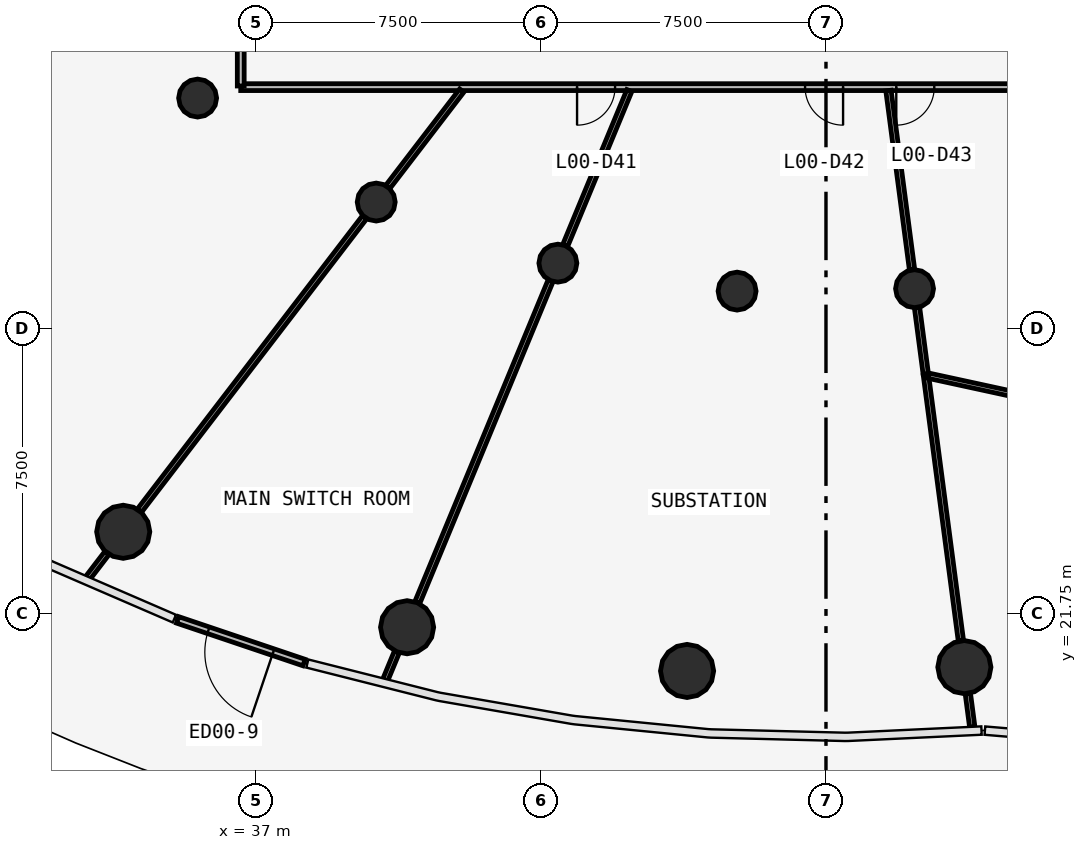
"""IFC4 building model, lengths in metres.
Left out: names, types, materials, properties, quantities, classifications, styles, units other than length and angle.
Written with IfcOpenShell. Run it as: python <this file> out.ifc"""

import sys

from ifc_helpers import new_model, si_unit, direction, frame, frame_2d, origin, origin_2d, place, context, subcontext, project, spatial, rectangle, circle, extrude, source, transform, mapped, element, fill, save


model = new_model("IFC4")
c1 = context("Model", 3, precision=1e-05, world=origin(), true_north=direction((0.0, 1.0)))
c2 = subcontext(c1, "Body", "Model", "MODEL_VIEW")
j1 = project(units=[si_unit("LENGTHUNIT", "METRE"), si_unit("PLANEANGLEUNIT", "RADIAN")], contexts=[c1])
p1 = place(None, origin())
s1 = spatial("IfcSite", under=j1, at=p1, CompositionType="ELEMENT")
p2 = place(p1, origin())
s2 = spatial("IfcBuilding", under=s1, at=p2, CompositionType="ELEMENT")
p3 = place(p2, origin())
s3 = spatial("IfcBuildingStorey", under=s2, at=p3, CompositionType="ELEMENT", Elevation=0.0)
m1 = source(origin(), c2, "Body", "SweptSolid", [
    extrude(circle(Radius=0.7, at=origin_2d()), origin(), (0.0, 0.0, 1.0), 5.35),
])
for number, where, z_axis, x_axis in (
    (1, (33.508, 23.9, -0.35), (0.0, 0.0, 1.0), (1.0, 0.0, 0.0)),
    (2, (40.977, 21.389, -0.35), (0.0, 0.0, 1.0), (1.0, 0.0, 0.0)),
    (3, (48.345, 20.239, -0.35), (0.0, 0.0, 1.0), (1.0, 0.0, 0.0)),
    (4, (55.642, 20.339, -0.35), (0.0, 0.0, 1.0), (1.0, 0.0, 0.0)),
):
    element("IfcColumn", number, at=place(p3, frame(where, z_axis=z_axis, x_axis=x_axis)), inside=s3, PredefinedType="COLUMN", context=c2, shape_type="MappedRepresentation", body=[
        mapped(m1, transform((0.0, 0.0, 0.0), scale=1.0)),
    ])
m2 = source(origin(), c2, "Body", "SweptSolid", [
    extrude(circle(Radius=0.5, at=origin_2d()), origin(), (0.0, 0.0, 1.0), 5.35),
])
for number, where, z_axis, x_axis in (
    (5, (35.465, 35.312, -0.35), (0.0, 0.0, 1.0), (1.0, 0.0, 0.0)),
    (6, (40.165, 32.576, -0.35), (0.0, 0.0, 1.0), (1.0, 0.0, 0.0)),
    (7, (44.945, 30.969, -0.35), (0.0, 0.0, 1.0), (1.0, 0.0, 0.0)),
    (8, (49.661, 30.233, -0.35), (0.0, 0.0, 1.0), (1.0, 0.0, 0.0)),
    (9, (54.331, 30.297, -0.35), (0.0, 0.0, 1.0), (1.0, 0.0, 0.0)),
):
    element("IfcColumn", number, at=place(p3, frame(where, z_axis=z_axis, x_axis=x_axis)), inside=s3, PredefinedType="COLUMN", context=c2, shape_type="MappedRepresentation", body=[
        mapped(m2, transform((0.0, 0.0, 0.0), scale=1.0)),
    ])
p4 = place(p3, frame((38.266, 20.459, 0.0), z_axis=(0.0, 0.0, 1.0), x_axis=(-0.947474115606, 0.319832456541, 0.0)))
e10 = element("IfcWall", 10, at=p4, inside=s3, PredefinedType="STANDARD", context=c2, shape_type="SweptSolid", body=[
    extrude(rectangle(XDim=3.513, YDim=0.18, at=frame_2d((1.756, 0.0))), origin(), (0.0, 0.0, 1.0), 4.65),
])
p5 = place(p4, frame((0.856, 0.0, 0.0)))
e11 = element("IfcOpeningElement", 11, at=p5, cuts=e10, PredefinedType="OPENING", context=c2, shape_type="SweptSolid", body=[
    extrude(rectangle(XDim=1.8, YDim=2.2, at=frame_2d((0.9, 1.1))), frame((0.0, 0.1, 0.0), z_axis=(0.0, -1.0, 0.0), x_axis=(1.0, 0.0, 0.0)), (0.0, 0.0, 1.0), 0.2),
])
p6 = place(p3, frame((67.4, 35.6, 0.0), z_axis=(0.0, 0.0, 1.0), x_axis=(-1.0, 0.0, 0.0)))
e12 = element("IfcWall", 12, at=p6, inside=s3, PredefinedType="PARTITIONING", context=c2, shape_type="SweptSolid", body=[
    extrude(rectangle(XDim=30.8, YDim=0.18, at=frame_2d((15.4, 0.0))), origin(), (0.0, 0.0, 1.0), 3.85),
])
p7 = place(p6, frame((20.95, 0.0, 0.0)))
e13 = element("IfcOpeningElement", 13, at=p7, cuts=e12, PredefinedType="OPENING", context=c2, shape_type="SweptSolid", body=[
    extrude(rectangle(XDim=1.0, YDim=2.1, at=frame_2d((0.5, 1.05))), frame((0.0, 0.1, 0.0), z_axis=(0.0, -1.0, 0.0), x_axis=(1.0, 0.0, 0.0)), (0.0, 0.0, 1.0), 0.2),
])
p8 = place(p6, frame((14.95, 0.0, 0.0)))
e14 = element("IfcOpeningElement", 14, at=p8, cuts=e12, PredefinedType="OPENING", context=c2, shape_type="SweptSolid", body=[
    extrude(rectangle(XDim=1.0, YDim=2.1, at=frame_2d((0.5, 1.05))), frame((0.0, 0.1, 0.0), z_axis=(0.0, -1.0, 0.0), x_axis=(1.0, 0.0, 0.0)), (0.0, 0.0, 1.0), 0.2),
])
p9 = place(p6, frame((12.55, 0.0, 0.0)))
e15 = element("IfcOpeningElement", 15, at=p9, cuts=e12, PredefinedType="OPENING", context=c2, shape_type="SweptSolid", body=[
    extrude(rectangle(XDim=1.0, YDim=2.1, at=frame_2d((0.5, 1.05))), frame((0.0, 0.1, 0.0), z_axis=(0.0, -1.0, 0.0), x_axis=(1.0, 0.0, 0.0)), (0.0, 0.0, 1.0), 0.2),
])
p10 = place(p3, frame((36.6, 35.63, 0.0), z_axis=(0.0, 0.0, 1.0), x_axis=(0.0, 1.0, 0.0)))
e16 = element("IfcWall", 16, at=p10, inside=s3, PredefinedType="PARTITIONING", context=c2, shape_type="SweptSolid", body=[
    extrude(rectangle(XDim=23.583, YDim=0.18, at=frame_2d((11.791, 0.0))), origin(), (0.0, 0.0, 1.0), 3.85),
])
p11 = place(p10, frame((16.032, 0.0, 0.0)))
e17 = element("IfcOpeningElement", 17, at=p11, cuts=e16, PredefinedType="OPENING", context=c2, shape_type="SweptSolid", body=[
    extrude(rectangle(XDim=0.9, YDim=2.1, at=frame_2d((0.45, 1.05))), frame((0.0, 0.1, 0.0), z_axis=(0.0, -1.0, 0.0), x_axis=(1.0, 0.0, 0.0)), (0.0, 0.0, 1.0), 0.2),
])
p12 = place(p10, frame((13.232, 0.0, 0.0)))
e18 = element("IfcOpeningElement", 18, at=p12, cuts=e16, PredefinedType="OPENING", context=c2, shape_type="SweptSolid", body=[
    extrude(rectangle(XDim=0.9, YDim=2.1, at=frame_2d((0.45, 1.05))), frame((0.0, 0.1, 0.0), z_axis=(0.0, -1.0, 0.0), x_axis=(1.0, 0.0, 0.0)), (0.0, 0.0, 1.0), 0.2),
])
p13 = place(p10, frame((11.433, 0.0, 0.0)))
e19 = element("IfcOpeningElement", 19, at=p13, cuts=e16, PredefinedType="OPENING", context=c2, shape_type="SweptSolid", body=[
    extrude(rectangle(XDim=0.9, YDim=2.1, at=frame_2d((0.45, 1.05))), frame((0.0, 0.1, 0.0), z_axis=(0.0, -1.0, 0.0), x_axis=(1.0, 0.0, 0.0)), (0.0, 0.0, 1.0), 0.2),
])
p14 = place(p10, frame((9.133, 0.0, 0.0)))
e20 = element("IfcOpeningElement", 20, at=p14, cuts=e16, PredefinedType="OPENING", context=c2, shape_type="SweptSolid", body=[
    extrude(rectangle(XDim=1.0, YDim=2.1, at=frame_2d((0.5, 1.05))), frame((0.0, 0.1, 0.0), z_axis=(0.0, -1.0, 0.0), x_axis=(1.0, 0.0, 0.0)), (0.0, 0.0, 1.0), 0.2),
])
p15 = place(p3, frame((39.858, 32.176, 0.0), z_axis=(0.0, 0.0, 1.0), x_axis=(-0.608770295053, -0.793346537057, 0.0)))
e21 = element("IfcWall", 21, at=p15, inside=s3, PredefinedType="PARTITIONING", context=c2, shape_type="SweptSolid", body=[
    extrude(rectangle(XDim=9.727, YDim=0.14, at=frame_2d((4.864, 0.0))), origin(), (0.0, 0.0, 1.0), 3.85),
])
p16 = place(p3, frame((44.752, 30.502, 0.0), z_axis=(0.0, 0.0, 1.0), x_axis=(-0.382672728165, -0.923883966264, 0.0)))
e22 = element("IfcWall", 22, at=p16, inside=s3, PredefinedType="PARTITIONING", context=c2, shape_type="SweptSolid", body=[
    extrude(rectangle(XDim=9.16, YDim=0.14, at=frame_2d((4.58, 0.0))), origin(), (0.0, 0.0, 1.0), 3.85),
])
p17 = place(p3, frame((54.63, 28.022, 0.0), z_axis=(0.0, 0.0, 1.0), x_axis=(0.130536083574, -0.991443559102, 0.0)))
e23 = element("IfcWall", 23, at=p17, inside=s3, PredefinedType="PARTITIONING", context=c2, shape_type="SweptSolid", body=[
    extrude(rectangle(XDim=7.045, YDim=0.14, at=frame_2d((3.523, 0.0))), origin(), (0.0, 0.0, 1.0), 3.85),
])
p18 = place(p3, frame((54.703, 28.006, 0.0), z_axis=(0.0, 0.0, 1.0), x_axis=(0.977213758918, -0.212257554358, 0.0)))
e24 = element("IfcWall", 24, at=p18, inside=s3, PredefinedType="PARTITIONING", context=c2, shape_type="SweptSolid", body=[
    extrude(rectangle(XDim=6.243, YDim=0.14, at=frame_2d((3.122, 0.0))), origin(), (0.0, 0.0, 1.0), 3.85),
])
p19 = place(p3, frame((53.644, 35.51, 0.0), z_axis=(0.0, 0.0, 1.0), x_axis=(0.130548834981, -0.991441880135, 0.0)))
e25 = element("IfcWall", 25, at=p19, inside=s3, PredefinedType="PARTITIONING", context=c2, shape_type="SweptSolid", body=[
    extrude(rectangle(XDim=4.754, YDim=0.14, at=frame_2d((2.377, 0.0))), origin(), (0.0, 0.0, 1.0), 3.85),
])
p20 = place(p3, frame((46.826, 35.51, 0.0), z_axis=(0.0, 0.0, 1.0), x_axis=(-0.382672831764, -0.923883923353, 0.0)))
e26 = element("IfcWall", 26, at=p20, inside=s3, PredefinedType="PARTITIONING", context=c2, shape_type="SweptSolid", body=[
    extrude(rectangle(XDim=4.41, YDim=0.14, at=frame_2d((2.205, 0.0))), origin(), (0.0, 0.0, 1.0), 3.85),
])
p21 = place(p3, frame((42.416, 35.51, 0.0), z_axis=(0.0, 0.0, 1.0), x_axis=(-0.60874605662, -0.793365135703, 0.0)))
e27 = element("IfcWall", 27, at=p21, inside=s3, PredefinedType="PARTITIONING", context=c2, shape_type="SweptSolid", body=[
    extrude(rectangle(XDim=3.194, YDim=0.14, at=frame_2d((1.597, 0.0))), origin(), (0.0, 0.0, 1.0), 3.85),
])
p22 = place(p3, frame((54.396, 29.797, 0.0), z_axis=(0.0, 0.0, 1.0), x_axis=(0.130537046291, -0.991443432348, 0.0)))
e28 = element("IfcWall", 28, at=p22, inside=s3, PredefinedType="PARTITIONING", context=c2, shape_type="SweptSolid", body=[
    extrude(rectangle(XDim=1.76, YDim=0.14, at=frame_2d((0.88, 0.0))), origin(), (0.0, 0.0, 1.0), 3.85),
])
p23 = place(p3, frame((55.734, 19.64, 0.0), z_axis=(0.0, 0.0, 1.0), x_axis=(0.13059675412, -0.991435569169, 0.0)))
e29 = element("IfcWall", 29, at=p23, inside=s3, PredefinedType="PARTITIONING", context=c2, shape_type="SweptSolid", body=[
    extrude(rectangle(XDim=0.888, YDim=0.14, at=frame_2d((0.444, 0.0))), origin(), (0.0, 0.0, 1.0), 3.85),
])
p24 = place(p3, frame((33.079, 23.342, 0.0), z_axis=(0.0, 0.0, 1.0), x_axis=(-0.608939798959, -0.793216440351, 0.0)))
e30 = element("IfcWall", 30, at=p24, inside=s3, PredefinedType="PARTITIONING", context=c2, shape_type="SweptSolid", body=[
    extrude(rectangle(XDim=0.827, YDim=0.14, at=frame_2d((0.413, 0.0))), origin(), (0.0, 0.0, 1.0), 3.85),
])
p25 = place(p3, frame((40.708, 20.737, 0.0), z_axis=(0.0, 0.0, 1.0), x_axis=(-0.382692107758, -0.923875938998, 0.0)))
e31 = element("IfcWall", 31, at=p25, inside=s3, PredefinedType="PARTITIONING", context=c2, shape_type="SweptSolid", body=[
    extrude(rectangle(XDim=0.802, YDim=0.14, at=frame_2d((0.401, 0.0))), origin(), (0.0, 0.0, 1.0), 3.85),
])
m3 = source(origin(), c2, "Body", "SweptSolid", [
    extrude(rectangle(XDim=1.8, YDim=2.2, at=frame_2d((0.9, 1.1))), frame((0.0, 0.025, 0.0), z_axis=(0.0, -1.0, 0.0), x_axis=(1.0, 0.0, 0.0)), (0.0, 0.0, 1.0), 0.05),
])
p26 = place(p5, origin())
e32 = element("IfcDoor", 32, at=p26, inside=s3, OperationType="DOUBLE_DOOR_SINGLE_SWING", PredefinedType="DOOR", context=c2, shape_type="MappedRepresentation", body=[
    mapped(m3, transform((0.0, 0.0, 0.0), scale=1.0)),
])
fill(e11, e32)
m4 = source(origin(), c2, "Body", "SweptSolid", [
    extrude(rectangle(XDim=1.0, YDim=2.1, at=frame_2d((0.5, 1.05))), frame((0.0, 0.025, 0.0), z_axis=(0.0, -1.0, 0.0), x_axis=(1.0, 0.0, 0.0)), (0.0, 0.0, 1.0), 0.05),
])
p27 = place(p7, origin())
e33 = element("IfcDoor", 33, at=p27, inside=s3, OperationType="SINGLE_SWING_RIGHT", PredefinedType="DOOR", context=c2, shape_type="MappedRepresentation", body=[
    mapped(m4, transform((0.0, 0.0, 0.0), scale=1.0)),
])
fill(e13, e33)
p28 = place(p8, origin())
e34 = element("IfcDoor", 34, at=p28, inside=s3, OperationType="SINGLE_SWING_LEFT", PredefinedType="DOOR", context=c2, shape_type="MappedRepresentation", body=[
    mapped(m4, transform((0.0, 0.0, 0.0), scale=1.0)),
])
fill(e14, e34)
p29 = place(p9, origin())
e35 = element("IfcDoor", 35, at=p29, inside=s3, OperationType="SINGLE_SWING_RIGHT", PredefinedType="DOOR", context=c2, shape_type="MappedRepresentation", body=[
    mapped(m4, transform((0.0, 0.0, 0.0), scale=1.0)),
])
fill(e15, e35)
save(model, sys.argv[1])
